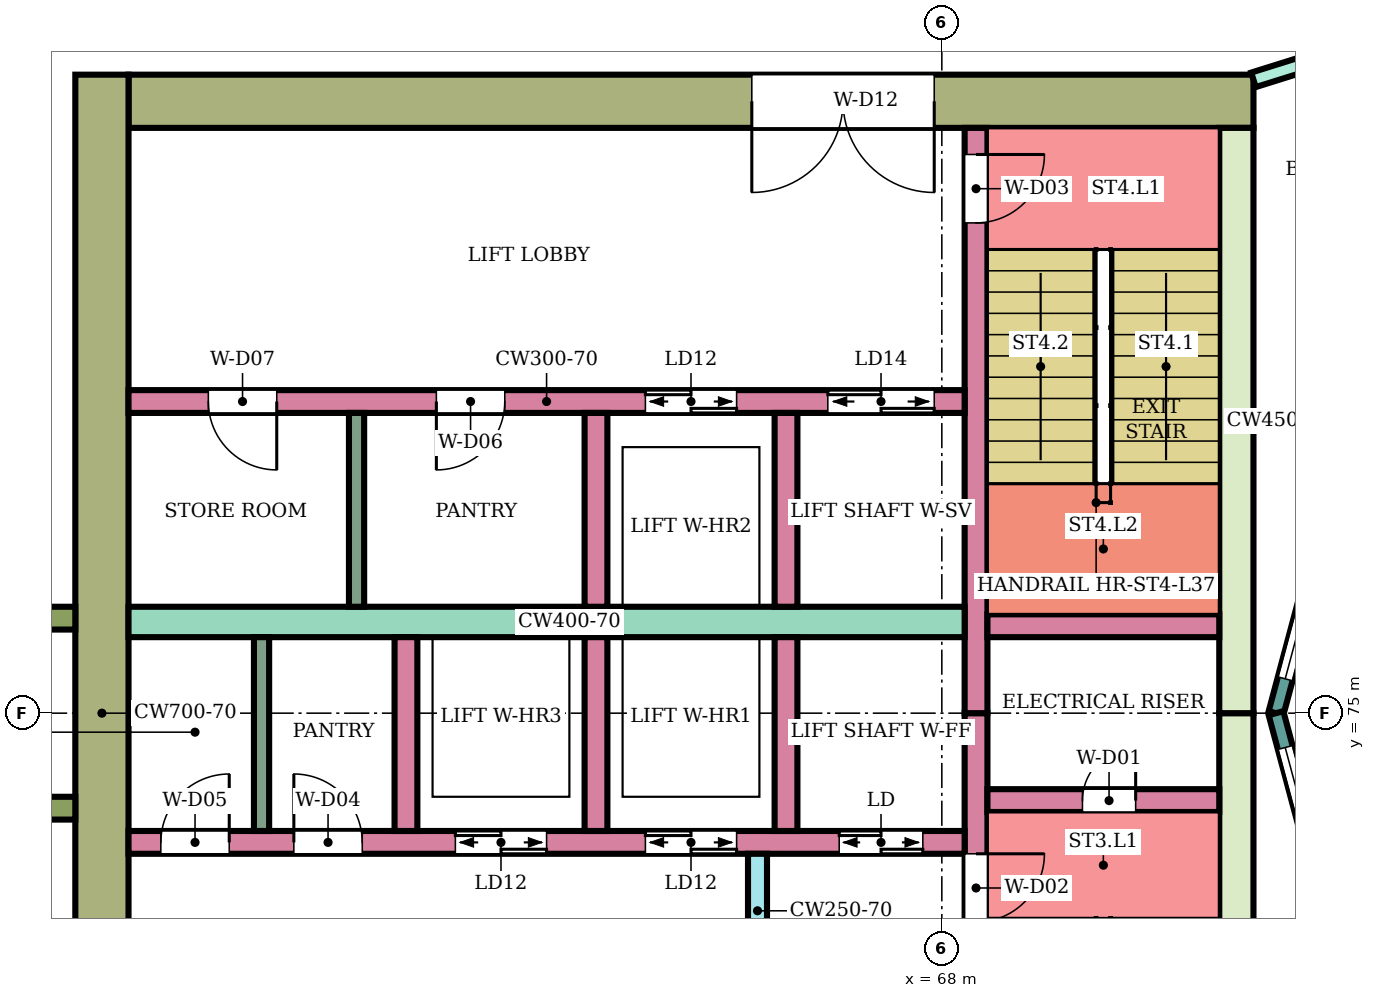
"""IFC4 building model, lengths in metres.
Left out: names, types, materials, properties, quantities, classifications, styles, units other than length and angle.
Written with IfcOpenShell. Run it as: python <this file> out.ifc"""

import sys

from ifc_helpers import new_model, si_unit, direction, frame, frame_2d, origin, place, context, subcontext, project, spatial, rectangle, extrude, element, fill, save


model = new_model("IFC4")
c1 = context("Model", 3, precision=1e-05, world=origin(), true_north=direction((0.0, 1.0)))
c2 = subcontext(c1, "Body", "Model", "MODEL_VIEW")
j1 = project(units=[si_unit("LENGTHUNIT", "METRE"), si_unit("PLANEANGLEUNIT", "RADIAN")], contexts=[c1])
p1 = place(None, origin())
s1 = spatial("IfcSite", under=j1, at=p1, CompositionType="ELEMENT")
p2 = place(p1, origin())
s2 = spatial("IfcBuilding", under=s1, at=p2, CompositionType="ELEMENT")
p3 = place(p2, frame((0.0, 0.0, 161.8)))
s3 = spatial("IfcBuildingStorey", under=s2, at=p3, CompositionType="ELEMENT", Elevation=161.8)
p4 = place(p3, frame((72.1, 83.05, 0.0), z_axis=(0.0, 0.0, 1.0), x_axis=(-1.0, 0.0, 0.0)))
e1 = element("IfcWall", 1, at=p4, inside=s3, PredefinedType="SHEAR", context=c2, shape_type="SweptSolid", body=[
    extrude(rectangle(XDim=14.8, YDim=0.7, at=frame_2d((7.4, 0.0))), origin(), (0.0, 0.0, 1.0), 3.78),
])
p5 = place(p4, frame((4.2, 0.0, 0.0)))
e2 = element("IfcOpeningElement", 2, at=p5, cuts=e1, PredefinedType="OPENING", context=c2, shape_type="SweptSolid", body=[
    extrude(rectangle(XDim=2.4, YDim=2.4, at=frame_2d((1.2, 1.2))), frame((0.0, 0.36, 0.0), z_axis=(0.0, -1.0, 0.0), x_axis=(1.0, 0.0, 0.0)), (0.0, 0.0, 1.0), 0.72),
])
for number, where, z_axis, x_axis in (
    (3, (71.875, 75.0, 0.0), (0.0, 0.0, 1.0), (0.0, -1.0, 0.0)),
    (4, (71.875, 82.7, 0.0), (0.0, 0.0, 1.0), (0.0, -1.0, 0.0)),
):
    element("IfcWall", number, at=place(p3, frame(where, z_axis=z_axis, x_axis=x_axis)), inside=s3, PredefinedType="SHEAR", context=c2, shape_type="SweptSolid", body=[
        extrude(rectangle(XDim=7.7, YDim=0.45, at=frame_2d((3.85, 0.0))), origin(), (0.0, 0.0, 1.0), 3.78),
    ])
p6 = place(p3, frame((56.95, 83.4, 0.0), z_axis=(0.0, 0.0, 1.0), x_axis=(0.0, -1.0, 0.0)))
e5 = element("IfcWall", 5, at=p6, inside=s3, PredefinedType="SHEAR", context=c2, shape_type="SweptSolid", body=[
    extrude(rectangle(XDim=16.8, YDim=0.7, at=frame_2d((8.4, 0.0))), origin(), (0.0, 0.0, 1.0), 3.78),
])
p7 = place(p3, frame((68.45, 75.0, 0.0), z_axis=(0.0, 0.0, 1.0), x_axis=(0.0, -1.0, 0.0)))
e6 = element("IfcWall", 6, at=p7, inside=s3, PredefinedType="SHEAR", context=c2, shape_type="SweptSolid", body=[
    extrude(rectangle(XDim=7.7, YDim=0.3, at=frame_2d((3.85, 0.0))), origin(), (0.0, 0.0, 1.0), 3.78),
])
p8 = place(p7, frame((1.85, 0.0, 0.0)))
e7 = element("IfcOpeningElement", 7, at=p8, cuts=e6, PredefinedType="OPENING", context=c2, shape_type="SweptSolid", body=[
    extrude(rectangle(XDim=0.9, YDim=2.1, at=frame_2d((0.45, 1.05))), frame((0.0, 0.16, 0.0), z_axis=(0.0, -1.0, 0.0), x_axis=(1.0, 0.0, 0.0)), (0.0, 0.0, 1.0), 0.32),
])
p9 = place(p3, frame((68.45, 82.7, 0.0), z_axis=(0.0, 0.0, 1.0), x_axis=(0.0, -1.0, 0.0)))
e8 = element("IfcWall", 8, at=p9, inside=s3, PredefinedType="SHEAR", context=c2, shape_type="SweptSolid", body=[
    extrude(rectangle(XDim=7.7, YDim=0.3, at=frame_2d((3.85, 0.0))), origin(), (0.0, 0.0, 1.0), 3.78),
])
p10 = place(p9, frame((0.35, 0.0, 0.0)))
e9 = element("IfcOpeningElement", 9, at=p10, cuts=e8, PredefinedType="OPENING", context=c2, shape_type="SweptSolid", body=[
    extrude(rectangle(XDim=0.9, YDim=2.1, at=frame_2d((0.45, 1.05))), frame((0.0, 0.16, 0.0), z_axis=(0.0, -1.0, 0.0), x_axis=(1.0, 0.0, 0.0)), (0.0, 0.0, 1.0), 0.32),
])
p11 = place(p3, frame((71.65, 73.85, 0.0), z_axis=(0.0, 0.0, 1.0), x_axis=(-1.0, 0.0, 0.0)))
e10 = element("IfcWall", 10, at=p11, inside=s3, PredefinedType="SHEAR", context=c2, shape_type="SweptSolid", body=[
    extrude(rectangle(XDim=3.05, YDim=0.3, at=frame_2d((1.525, 0.0))), origin(), (0.0, 0.0, 1.0), 3.78),
])
p12 = place(p11, frame((1.1, 0.0, 0.0)))
e11 = element("IfcOpeningElement", 11, at=p12, cuts=e10, PredefinedType="OPENING", context=c2, shape_type="SweptSolid", body=[
    extrude(rectangle(XDim=0.7, YDim=2.0, at=frame_2d((0.35, 1.0))), frame((0.0, 0.16, 0.0), z_axis=(0.0, -1.0, 0.0), x_axis=(1.0, 0.0, 0.0)), (0.0, 0.0, 1.0), 0.32),
])
p13 = place(p3, frame((71.65, 76.15, 0.0), z_axis=(0.0, 0.0, 1.0), x_axis=(-1.0, 0.0, 0.0)))
e12 = element("IfcWall", 12, at=p13, inside=s3, PredefinedType="SHEAR", context=c2, shape_type="SweptSolid", body=[
    extrude(rectangle(XDim=3.05, YDim=0.3, at=frame_2d((1.525, 0.0))), origin(), (0.0, 0.0, 1.0), 3.78),
])
p14 = place(p3, frame((68.3, 73.3, 0.0), z_axis=(0.0, 0.0, 1.0), x_axis=(-1.0, 0.0, 0.0)))
e13 = element("IfcWall", 13, at=p14, inside=s3, PredefinedType="SHEAR", context=c2, shape_type="SweptSolid", body=[
    extrude(rectangle(XDim=11.0, YDim=0.3, at=frame_2d((5.5, 0.0))), origin(), (0.0, 0.0, 1.0), 3.78),
])
p15 = place(p14, frame((0.55, 0.0, 0.0)))
e14 = element("IfcOpeningElement", 14, at=p15, cuts=e13, PredefinedType="OPENING", context=c2, shape_type="SweptSolid", body=[
    extrude(rectangle(XDim=1.1, YDim=2.1, at=frame_2d((0.55, 1.05))), frame((0.0, 0.16, 0.0), z_axis=(0.0, -1.0, 0.0), x_axis=(1.0, 0.0, 0.0)), (0.0, 0.0, 1.0), 0.32),
])
p16 = place(p14, frame((3.0, 0.0, 0.0)))
e15 = element("IfcOpeningElement", 15, at=p16, cuts=e13, PredefinedType="OPENING", context=c2, shape_type="SweptSolid", body=[
    extrude(rectangle(XDim=1.2, YDim=2.1, at=frame_2d((0.6, 1.05))), frame((0.0, 0.16, 0.0), z_axis=(0.0, -1.0, 0.0), x_axis=(1.0, 0.0, 0.0)), (0.0, 0.0, 1.0), 0.32),
])
p17 = place(p14, frame((5.5, 0.0, 0.0)))
e16 = element("IfcOpeningElement", 16, at=p17, cuts=e13, PredefinedType="OPENING", context=c2, shape_type="SweptSolid", body=[
    extrude(rectangle(XDim=1.2, YDim=2.1, at=frame_2d((0.6, 1.05))), frame((0.0, 0.16, 0.0), z_axis=(0.0, -1.0, 0.0), x_axis=(1.0, 0.0, 0.0)), (0.0, 0.0, 1.0), 0.32),
])
p18 = place(p14, frame((7.925, 0.0, 0.0)))
e17 = element("IfcOpeningElement", 17, at=p18, cuts=e13, PredefinedType="OPENING", context=c2, shape_type="SweptSolid", body=[
    extrude(rectangle(XDim=0.9, YDim=2.1, at=frame_2d((0.45, 1.05))), frame((0.0, 0.16, 0.0), z_axis=(0.0, -1.0, 0.0), x_axis=(1.0, 0.0, 0.0)), (0.0, 0.0, 1.0), 0.32),
])
p19 = place(p14, frame((9.675, 0.0, 0.0)))
e18 = element("IfcOpeningElement", 18, at=p19, cuts=e13, PredefinedType="OPENING", context=c2, shape_type="SweptSolid", body=[
    extrude(rectangle(XDim=0.9, YDim=2.1, at=frame_2d((0.45, 1.05))), frame((0.0, 0.16, 0.0), z_axis=(0.0, -1.0, 0.0), x_axis=(1.0, 0.0, 0.0)), (0.0, 0.0, 1.0), 0.32),
])
p20 = place(p3, frame((68.3, 76.2, 0.0), z_axis=(0.0, 0.0, 1.0), x_axis=(-1.0, 0.0, 0.0)))
e19 = element("IfcWall", 19, at=p20, inside=s3, PredefinedType="SHEAR", context=c2, shape_type="SweptSolid", body=[
    extrude(rectangle(XDim=11.0, YDim=0.4, at=frame_2d((5.5, 0.0))), origin(), (0.0, 0.0, 1.0), 3.78),
])
p21 = place(p3, frame((68.3, 79.1, 0.0), z_axis=(0.0, 0.0, 1.0), x_axis=(-1.0, 0.0, 0.0)))
e20 = element("IfcWall", 20, at=p21, inside=s3, PredefinedType="SHEAR", context=c2, shape_type="SweptSolid", body=[
    extrude(rectangle(XDim=11.0, YDim=0.3, at=frame_2d((5.5, 0.0))), origin(), (0.0, 0.0, 1.0), 3.78),
])
p22 = place(p21, frame((0.4, 0.0, 0.0)))
e21 = element("IfcOpeningElement", 21, at=p22, cuts=e20, PredefinedType="OPENING", context=c2, shape_type="SweptSolid", body=[
    extrude(rectangle(XDim=1.4, YDim=2.1, at=frame_2d((0.7, 1.05))), frame((0.0, 0.16, 0.0), z_axis=(0.0, -1.0, 0.0), x_axis=(1.0, 0.0, 0.0)), (0.0, 0.0, 1.0), 0.32),
])
p23 = place(p21, frame((3.0, 0.0, 0.0)))
e22 = element("IfcOpeningElement", 22, at=p23, cuts=e20, PredefinedType="OPENING", context=c2, shape_type="SweptSolid", body=[
    extrude(rectangle(XDim=1.2, YDim=2.1, at=frame_2d((0.6, 1.05))), frame((0.0, 0.16, 0.0), z_axis=(0.0, -1.0, 0.0), x_axis=(1.0, 0.0, 0.0)), (0.0, 0.0, 1.0), 0.32),
])
p24 = place(p21, frame((6.05, 0.0, 0.0)))
e23 = element("IfcOpeningElement", 23, at=p24, cuts=e20, PredefinedType="OPENING", context=c2, shape_type="SweptSolid", body=[
    extrude(rectangle(XDim=0.9, YDim=2.1, at=frame_2d((0.45, 1.05))), frame((0.0, 0.16, 0.0), z_axis=(0.0, -1.0, 0.0), x_axis=(1.0, 0.0, 0.0)), (0.0, 0.0, 1.0), 0.32),
])
p25 = place(p21, frame((9.05, 0.0, 0.0)))
e24 = element("IfcOpeningElement", 24, at=p25, cuts=e20, PredefinedType="OPENING", context=c2, shape_type="SweptSolid", body=[
    extrude(rectangle(XDim=0.9, YDim=2.1, at=frame_2d((0.45, 1.05))), frame((0.0, 0.16, 0.0), z_axis=(0.0, -1.0, 0.0), x_axis=(1.0, 0.0, 0.0)), (0.0, 0.0, 1.0), 0.32),
])
for number, where, z_axis, x_axis in (
    (25, (65.95, 76.0, 0.0), (0.0, 0.0, 1.0), (0.0, -1.0, 0.0)),
    (26, (63.45, 76.0, 0.0), (0.0, 0.0, 1.0), (0.0, -1.0, 0.0)),
    (27, (60.95, 76.0, 0.0), (0.0, 0.0, 1.0), (0.0, -1.0, 0.0)),
    (28, (65.95, 78.95, 0.0), (0.0, 0.0, 1.0), (0.0, -1.0, 0.0)),
    (29, (63.45, 78.95, 0.0), (0.0, 0.0, 1.0), (0.0, -1.0, 0.0)),
):
    element("IfcWall", number, at=place(p3, frame(where, z_axis=z_axis, x_axis=x_axis)), inside=s3, PredefinedType="SHEAR", context=c2, shape_type="SweptSolid", body=[
        extrude(rectangle(XDim=2.55, YDim=0.3, at=frame_2d((1.275, 0.0))), origin(), (0.0, 0.0, 1.0), 3.78),
    ])
p26 = place(p3, frame((65.575, 73.15, 0.0), z_axis=(0.0, 0.0, 1.0), x_axis=(0.0, -1.0, 0.0)))
e30 = element("IfcWall", 30, at=p26, inside=s3, PredefinedType="SHEAR", context=c2, shape_type="SweptSolid", body=[
    extrude(rectangle(XDim=1.5, YDim=0.25, at=frame_2d((0.75, 0.0))), origin(), (0.0, 0.0, 1.0), 3.78),
])
for number, where, z_axis, x_axis in (
    (31, (56.6, 76.25, 0.0), (0.0, 0.0, 1.0), (-1.0, 0.0, 0.0)),
    (32, (56.6, 73.75, 0.0), (0.0, 0.0, 1.0), (-1.0, 0.0, 0.0)),
):
    element("IfcWall", number, at=place(p3, frame(where, z_axis=z_axis, x_axis=x_axis)), inside=s3, PredefinedType="NOTDEFINED", context=c2, shape_type="SweptSolid", body=[
        extrude(rectangle(XDim=2.416, YDim=0.3, at=frame_2d((1.208, 0.0))), origin(), (0.0, 0.0, 1.0), 4.1),
    ])
p27 = place(p3, frame((73.415, 78.802, 0.0), z_axis=(0.0, 0.0, 1.0), x_axis=(-0.258789828301, -0.965933654434, 0.0)))
e33 = element("IfcWall", 33, at=p27, inside=s3, PredefinedType="NOTDEFINED", context=c2, shape_type="SweptSolid", body=[
    extrude(rectangle(XDim=3.936, YDim=0.2, at=frame_2d((1.968, 0.0))), origin(), (0.0, 0.0, 1.0), 4.1),
])
p28 = place(p27, frame((0.468, 0.0, 0.9)))
e34 = element("IfcOpeningElement", 34, at=p28, cuts=e33, PredefinedType="OPENING", context=c2, shape_type="SweptSolid", body=[
    extrude(rectangle(XDim=3.0, YDim=2.3, at=frame_2d((1.5, 1.15))), frame((0.0, 0.11, 0.0), z_axis=(0.0, -1.0, 0.0), x_axis=(1.0, 0.0, 0.0)), (0.0, 0.0, 1.0), 0.22),
])
p29 = place(p3, frame((72.396, 75.0, 0.0), z_axis=(0.0, 0.0, 1.0), x_axis=(0.258789828301, -0.965933654434, 0.0)))
e35 = element("IfcWall", 35, at=p29, inside=s3, PredefinedType="NOTDEFINED", context=c2, shape_type="SweptSolid", body=[
    extrude(rectangle(XDim=3.936, YDim=0.2, at=frame_2d((1.968, 0.0))), origin(), (0.0, 0.0, 1.0), 4.1),
])
p30 = place(p29, frame((0.468, 0.0, 0.9)))
e36 = element("IfcOpeningElement", 36, at=p30, cuts=e35, PredefinedType="OPENING", context=c2, shape_type="SweptSolid", body=[
    extrude(rectangle(XDim=3.0, YDim=2.3, at=frame_2d((1.5, 1.15))), frame((0.0, 0.11, 0.0), z_axis=(0.0, -1.0, 0.0), x_axis=(1.0, 0.0, 0.0)), (0.0, 0.0, 1.0), 0.22),
])
p31 = place(p3, frame((72.1, 83.332, 0.0), z_axis=(0.0, 0.0, 1.0), x_axis=(0.954233106619, 0.299063836383, 0.0)))
e37 = element("IfcWall", 37, at=p31, inside=s3, PredefinedType="PARTITIONING", context=c2, shape_type="SweptSolid", body=[
    extrude(rectangle(XDim=2.414, YDim=0.2, at=frame_2d((1.207, 0.0))), origin(), (0.0, 0.0, 1.0), 3.65),
])
p32 = place(p31, frame((0.762, 0.0, 0.0)))
e38 = element("IfcOpeningElement", 38, at=p32, cuts=e37, PredefinedType="OPENING", context=c2, shape_type="SweptSolid", body=[
    extrude(rectangle(XDim=0.9, YDim=2.1, at=frame_2d((0.45, 1.05))), frame((0.0, 0.11, 0.0), z_axis=(0.0, -1.0, 0.0), x_axis=(1.0, 0.0, 0.0)), (0.0, 0.0, 1.0), 0.22),
])
for number, where, z_axis, x_axis in (
    (39, (59.05, 76.0, 0.0), (0.0, 0.0, 1.0), (0.0, -1.0, 0.0)),
    (40, (60.3, 78.95, 0.0), (0.0, 0.0, 1.0), (0.0, -1.0, 0.0)),
):
    element("IfcWall", number, at=place(p3, frame(where, z_axis=z_axis, x_axis=x_axis)), inside=s3, PredefinedType="PARTITIONING", context=c2, shape_type="SweptSolid", body=[
        extrude(rectangle(XDim=2.55, YDim=0.2, at=frame_2d((1.275, 0.0))), origin(), (0.0, 0.0, 1.0), 3.78),
    ])
p33 = place(p28, origin())
e41 = element("IfcWindow", 41, at=p33, inside=s3, PartitioningType="SINGLE_PANEL", PredefinedType="WINDOW", context=c2, shape_type="SweptSolid", body=[
    extrude(rectangle(XDim=3.0, YDim=2.3, at=frame_2d((1.5, 1.15))), frame((0.0, 0.03, 0.0), z_axis=(0.0, -1.0, 0.0), x_axis=(1.0, 0.0, 0.0)), (0.0, 0.0, 1.0), 0.06),
])
fill(e34, e41)
p34 = place(p30, origin())
e42 = element("IfcWindow", 42, at=p34, inside=s3, PartitioningType="SINGLE_PANEL", PredefinedType="WINDOW", context=c2, shape_type="SweptSolid", body=[
    extrude(rectangle(XDim=3.0, YDim=2.3, at=frame_2d((1.5, 1.15))), frame((0.0, 0.03, 0.0), z_axis=(0.0, -1.0, 0.0), x_axis=(1.0, 0.0, 0.0)), (0.0, 0.0, 1.0), 0.06),
])
fill(e36, e42)
p35 = place(p12, frame((0.7, 0.0, 0.0), z_axis=(0.0, 0.0, 1.0), x_axis=(-1.0, 0.0, 0.0)))
e43 = element("IfcDoor", 43, at=p35, inside=s3, OperationType="SINGLE_SWING_RIGHT", PredefinedType="DOOR", context=c2, shape_type="SweptSolid", body=[
    extrude(rectangle(XDim=0.7, YDim=2.0, at=frame_2d((0.35, 1.0))), frame((0.0, 0.025, 0.0), z_axis=(0.0, -1.0, 0.0), x_axis=(1.0, 0.0, 0.0)), (0.0, 0.0, 1.0), 0.05),
])
fill(e11, e43)
p36 = place(p8, origin())
e44 = element("IfcDoor", 44, at=p36, inside=s3, OperationType="SINGLE_SWING_LEFT", PredefinedType="DOOR", context=c2, shape_type="SweptSolid", body=[
    extrude(rectangle(XDim=0.9, YDim=2.1, at=frame_2d((0.45, 1.05))), frame((0.0, 0.025, 0.0), z_axis=(0.0, -1.0, 0.0), x_axis=(1.0, 0.0, 0.0)), (0.0, 0.0, 1.0), 0.05),
])
fill(e7, e44)
p37 = place(p10, origin())
e45 = element("IfcDoor", 45, at=p37, inside=s3, OperationType="SINGLE_SWING_LEFT", PredefinedType="DOOR", context=c2, shape_type="SweptSolid", body=[
    extrude(rectangle(XDim=0.9, YDim=2.1, at=frame_2d((0.45, 1.05))), frame((0.0, 0.025, 0.0), z_axis=(0.0, -1.0, 0.0), x_axis=(1.0, 0.0, 0.0)), (0.0, 0.0, 1.0), 0.05),
])
fill(e9, e45)
p38 = place(p15, origin())
e46 = element("IfcDoor", 46, at=p38, inside=s3, OperationType="DOUBLE_DOOR_SLIDING", PredefinedType="DOOR", context=c2, shape_type="SweptSolid", body=[
    extrude(rectangle(XDim=1.1, YDim=2.1, at=frame_2d((0.55, 1.05))), frame((0.0, 0.025, 0.0), z_axis=(0.0, -1.0, 0.0), x_axis=(1.0, 0.0, 0.0)), (0.0, 0.0, 1.0), 0.05),
])
fill(e14, e46)
p39 = place(p16, origin())
e47 = element("IfcDoor", 47, at=p39, inside=s3, OperationType="DOUBLE_DOOR_SLIDING", PredefinedType="DOOR", context=c2, shape_type="SweptSolid", body=[
    extrude(rectangle(XDim=1.2, YDim=2.1, at=frame_2d((0.6, 1.05))), frame((0.0, 0.025, 0.0), z_axis=(0.0, -1.0, 0.0), x_axis=(1.0, 0.0, 0.0)), (0.0, 0.0, 1.0), 0.05),
])
fill(e15, e47)
p40 = place(p17, origin())
e48 = element("IfcDoor", 48, at=p40, inside=s3, OperationType="DOUBLE_DOOR_SLIDING", PredefinedType="DOOR", context=c2, shape_type="SweptSolid", body=[
    extrude(rectangle(XDim=1.2, YDim=2.1, at=frame_2d((0.6, 1.05))), frame((0.0, 0.025, 0.0), z_axis=(0.0, -1.0, 0.0), x_axis=(1.0, 0.0, 0.0)), (0.0, 0.0, 1.0), 0.05),
])
fill(e16, e48)
p41 = place(p18, frame((0.9, 0.0, 0.0), z_axis=(0.0, 0.0, 1.0), x_axis=(-1.0, 0.0, 0.0)))
e49 = element("IfcDoor", 49, at=p41, inside=s3, OperationType="SINGLE_SWING_LEFT", PredefinedType="DOOR", context=c2, shape_type="SweptSolid", body=[
    extrude(rectangle(XDim=0.9, YDim=2.1, at=frame_2d((0.45, 1.05))), frame((0.0, 0.025, 0.0), z_axis=(0.0, -1.0, 0.0), x_axis=(1.0, 0.0, 0.0)), (0.0, 0.0, 1.0), 0.05),
])
fill(e17, e49)
p42 = place(p19, frame((0.9, 0.0, 0.0), z_axis=(0.0, 0.0, 1.0), x_axis=(-1.0, 0.0, 0.0)))
e50 = element("IfcDoor", 50, at=p42, inside=s3, OperationType="SINGLE_SWING_RIGHT", PredefinedType="DOOR", context=c2, shape_type="SweptSolid", body=[
    extrude(rectangle(XDim=0.9, YDim=2.1, at=frame_2d((0.45, 1.05))), frame((0.0, 0.025, 0.0), z_axis=(0.0, -1.0, 0.0), x_axis=(1.0, 0.0, 0.0)), (0.0, 0.0, 1.0), 0.05),
])
fill(e18, e50)
p43 = place(p22, origin())
e51 = element("IfcDoor", 51, at=p43, inside=s3, OperationType="DOUBLE_DOOR_SLIDING", PredefinedType="DOOR", context=c2, shape_type="SweptSolid", body=[
    extrude(rectangle(XDim=1.4, YDim=2.1, at=frame_2d((0.7, 1.05))), frame((0.0, 0.025, 0.0), z_axis=(0.0, -1.0, 0.0), x_axis=(1.0, 0.0, 0.0)), (0.0, 0.0, 1.0), 0.05),
])
fill(e21, e51)
p44 = place(p23, origin())
e52 = element("IfcDoor", 52, at=p44, inside=s3, OperationType="DOUBLE_DOOR_SLIDING", PredefinedType="DOOR", context=c2, shape_type="SweptSolid", body=[
    extrude(rectangle(XDim=1.2, YDim=2.1, at=frame_2d((0.6, 1.05))), frame((0.0, 0.025, 0.0), z_axis=(0.0, -1.0, 0.0), x_axis=(1.0, 0.0, 0.0)), (0.0, 0.0, 1.0), 0.05),
])
fill(e22, e52)
p45 = place(p24, origin())
e53 = element("IfcDoor", 53, at=p45, inside=s3, OperationType="SINGLE_SWING_RIGHT", PredefinedType="DOOR", context=c2, shape_type="SweptSolid", body=[
    extrude(rectangle(XDim=0.9, YDim=2.1, at=frame_2d((0.45, 1.05))), frame((0.0, 0.025, 0.0), z_axis=(0.0, -1.0, 0.0), x_axis=(1.0, 0.0, 0.0)), (0.0, 0.0, 1.0), 0.05),
])
fill(e23, e53)
p46 = place(p25, origin())
e54 = element("IfcDoor", 54, at=p46, inside=s3, OperationType="SINGLE_SWING_LEFT", PredefinedType="DOOR", context=c2, shape_type="SweptSolid", body=[
    extrude(rectangle(XDim=0.9, YDim=2.1, at=frame_2d((0.45, 1.05))), frame((0.0, 0.025, 0.0), z_axis=(0.0, -1.0, 0.0), x_axis=(1.0, 0.0, 0.0)), (0.0, 0.0, 1.0), 0.05),
])
fill(e24, e54)
p47 = place(p5, origin())
e55 = element("IfcDoor", 55, at=p47, inside=s3, OperationType="DOUBLE_DOOR_SINGLE_SWING", PredefinedType="DOOR", context=c2, shape_type="SweptSolid", body=[
    extrude(rectangle(XDim=2.4, YDim=2.4, at=frame_2d((1.2, 1.2))), frame((0.0, 0.025, 0.0), z_axis=(0.0, -1.0, 0.0), x_axis=(1.0, 0.0, 0.0)), (0.0, 0.0, 1.0), 0.05),
])
fill(e2, e55)
save(model, sys.argv[1])
